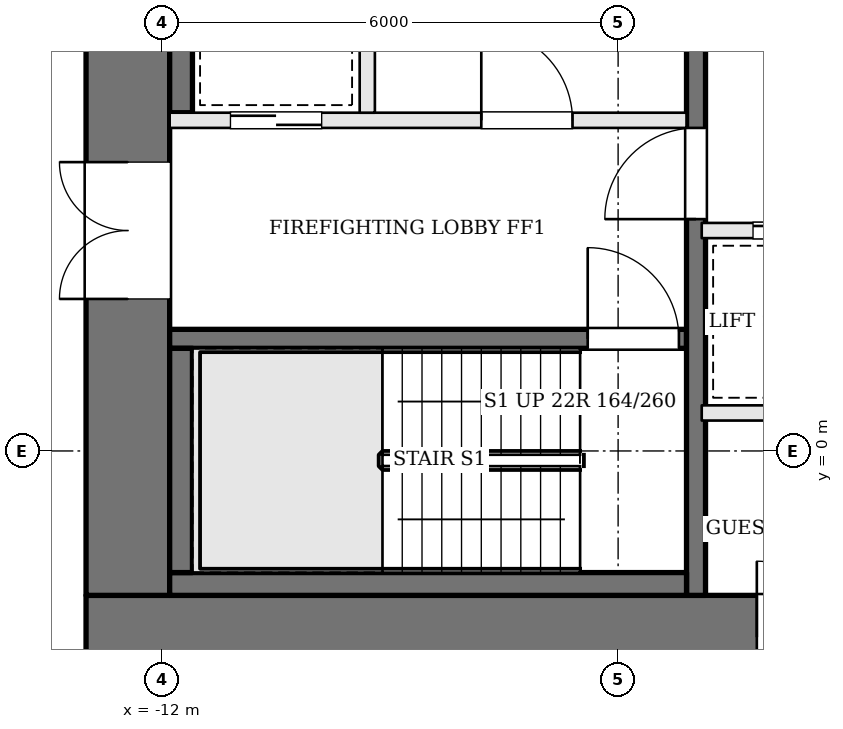
"""IFC4 building model, lengths in metres.
Left out: names, types, materials, properties, quantities, classifications, styles, units other than length and angle.
Written with IfcOpenShell. Run it as: python <this file> out.ifc"""

import sys

from ifc_helpers import new_model, si_unit, direction, frame, frame_2d, origin, place, context, subcontext, project, spatial, rectangle, extrude, element, fill, save


model = new_model("IFC4")
c1 = context("Model", 3, precision=1e-05, world=origin(), true_north=direction((0.0, 1.0)))
c2 = subcontext(c1, "Body", "Model", "MODEL_VIEW")
j1 = project(units=[si_unit("LENGTHUNIT", "METRE"), si_unit("PLANEANGLEUNIT", "RADIAN")], contexts=[c1])
p1 = place(None, origin())
s1 = spatial("IfcSite", under=j1, at=p1, CompositionType="ELEMENT")
p2 = place(p1, origin())
s2 = spatial("IfcBuilding", under=s1, at=p2, CompositionType="ELEMENT")
p3 = place(p2, frame((0.0, 0.0, 117.6)))
s3 = spatial("IfcBuildingStorey", under=s2, at=p3, CompositionType="ELEMENT", Elevation=117.6)
p4 = place(p3, frame((-13.0, -2.45, 0.0), z_axis=(0.0, 0.0, 1.0), x_axis=(1.0, 0.0, 0.0)))
e1 = element("IfcWall", 1, at=p4, inside=s3, PredefinedType="SHEAR", context=c2, shape_type="SweptSolid", body=[
    extrude(rectangle(XDim=26.0, YDim=1.1, at=frame_2d((13.0, 0.0))), origin(), (0.0, 0.0, 1.0), 3.6),
])
p5 = place(p4, frame((8.825, 0.0, 0.0)))
e2 = element("IfcOpeningElement", 2, at=p5, cuts=e1, PredefinedType="OPENING", context=c2, shape_type="SweptSolid", body=[
    extrude(rectangle(XDim=1.0, YDim=2.1, at=frame_2d((0.5, 1.05))), frame((0.0, 0.56, 0.0), z_axis=(0.0, -1.0, 0.0), x_axis=(1.0, 0.0, 0.0)), (0.0, 0.0, 1.0), 1.12),
])
p6 = place(p4, frame((11.275, 0.0, 0.0)))
e3 = element("IfcOpeningElement", 3, at=p6, cuts=e1, PredefinedType="OPENING", context=c2, shape_type="SweptSolid", body=[
    extrude(rectangle(XDim=1.0, YDim=2.1, at=frame_2d((0.5, 1.05))), frame((0.0, 0.56, 0.0), z_axis=(0.0, -1.0, 0.0), x_axis=(1.0, 0.0, 0.0)), (0.0, 0.0, 1.0), 1.12),
])
p7 = place(p4, frame((13.475, 0.0, 0.0)))
e4 = element("IfcOpeningElement", 4, at=p7, cuts=e1, PredefinedType="OPENING", context=c2, shape_type="SweptSolid", body=[
    extrude(rectangle(XDim=0.7, YDim=2.1, at=frame_2d((0.35, 1.05))), frame((0.0, 0.56, 0.0), z_axis=(0.0, -1.0, 0.0), x_axis=(1.0, 0.0, 0.0)), (0.0, 0.0, 1.0), 1.12),
])
p8 = place(p4, frame((15.775, 0.0, 0.0)))
e5 = element("IfcOpeningElement", 5, at=p8, cuts=e1, PredefinedType="OPENING", context=c2, shape_type="SweptSolid", body=[
    extrude(rectangle(XDim=1.0, YDim=2.1, at=frame_2d((0.5, 1.05))), frame((0.0, 0.56, 0.0), z_axis=(0.0, -1.0, 0.0), x_axis=(1.0, 0.0, 0.0)), (0.0, 0.0, 1.0), 1.12),
])
p9 = place(p3, frame((-12.45, -1.9, 0.0), z_axis=(0.0, 0.0, 1.0), x_axis=(0.0, 1.0, 0.0)))
e6 = element("IfcWall", 6, at=p9, inside=s3, PredefinedType="SHEAR", context=c2, shape_type="SweptSolid", body=[
    extrude(rectangle(XDim=12.8, YDim=1.1, at=frame_2d((6.4, 0.0))), origin(), (0.0, 0.0, 1.0), 3.6),
])
p10 = place(p9, frame((3.9, 0.0, 0.0)))
e7 = element("IfcOpeningElement", 7, at=p10, cuts=e6, PredefinedType="OPENING", context=c2, shape_type="SweptSolid", body=[
    extrude(rectangle(XDim=1.8, YDim=2.1, at=frame_2d((0.9, 1.05))), frame((0.0, 0.56, 0.0), z_axis=(0.0, -1.0, 0.0), x_axis=(1.0, 0.0, 0.0)), (0.0, 0.0, 1.0), 1.12),
])
p11 = place(p3, frame((-11.9, 1.475, 0.0), z_axis=(0.0, 0.0, 1.0), x_axis=(1.0, 0.0, 0.0)))
e8 = element("IfcWall", 8, at=p11, inside=s3, PredefinedType="SOLIDWALL", context=c2, shape_type="SweptSolid", body=[
    extrude(rectangle(XDim=6.8, YDim=0.25, at=frame_2d((3.4, 0.0))), origin(), (0.0, 0.0, 1.0), 3.3),
])
p12 = place(p11, frame((5.5, 0.0, 0.0)))
e9 = element("IfcOpeningElement", 9, at=p12, cuts=e8, PredefinedType="OPENING", context=c2, shape_type="SweptSolid", body=[
    extrude(rectangle(XDim=1.2, YDim=2.1, at=frame_2d((0.6, 1.05))), frame((0.0, 0.135, 0.0), z_axis=(0.0, -1.0, 0.0), x_axis=(1.0, 0.0, 0.0)), (0.0, 0.0, 1.0), 0.27),
])
p13 = place(p3, frame((-11.9, 4.35, 0.0), z_axis=(0.0, 0.0, 1.0), x_axis=(1.0, 0.0, 0.0)))
e10 = element("IfcWall", 10, at=p13, inside=s3, PredefinedType="SOLIDWALL", context=c2, shape_type="SweptSolid", body=[
    extrude(rectangle(XDim=6.8, YDim=0.2, at=frame_2d((3.4, 0.0))), origin(), (0.0, 0.0, 1.0), 3.3),
])
p14 = place(p13, frame((4.1, 0.0, 0.0)))
e11 = element("IfcOpeningElement", 11, at=p14, cuts=e10, PredefinedType="OPENING", context=c2, shape_type="SweptSolid", body=[
    extrude(rectangle(XDim=1.2, YDim=2.1, at=frame_2d((0.6, 1.05))), frame((0.0, 0.11, 0.0), z_axis=(0.0, -1.0, 0.0), x_axis=(1.0, 0.0, 0.0)), (0.0, 0.0, 1.0), 0.22),
])
p15 = place(p13, frame((0.8, 0.0, 0.0)))
e12 = element("IfcOpeningElement", 12, at=p15, cuts=e10, PredefinedType="OPENING", context=c2, shape_type="SweptSolid", body=[
    extrude(rectangle(XDim=1.2, YDim=2.1, at=frame_2d((0.6, 1.05))), frame((0.0, 0.11, 0.0), z_axis=(0.0, -1.0, 0.0), x_axis=(1.0, 0.0, 0.0)), (0.0, 0.0, 1.0), 0.22),
])
p16 = place(p3, frame((-9.3, 4.45, 0.0), z_axis=(0.0, 0.0, 1.0), x_axis=(0.0, 1.0, 0.0)))
e13 = element("IfcWall", 13, at=p16, inside=s3, PredefinedType="SOLIDWALL", context=c2, shape_type="SweptSolid", body=[
    extrude(rectangle(XDim=3.0, YDim=0.2, at=frame_2d((1.5, 0.0))), origin(), (0.0, 0.0, 1.0), 3.3),
])
p17 = place(p3, frame((-4.975, -1.9, 0.0), z_axis=(0.0, 0.0, 1.0), x_axis=(0.0, 1.0, 0.0)))
e14 = element("IfcWall", 14, at=p17, inside=s3, PredefinedType="SOLIDWALL", context=c2, shape_type="SweptSolid", body=[
    extrude(rectangle(XDim=12.8, YDim=0.25, at=frame_2d((6.4, 0.0))), origin(), (0.0, 0.0, 1.0), 3.3),
])
p18 = place(p17, frame((4.95, 0.0, 0.0)))
e15 = element("IfcOpeningElement", 15, at=p18, cuts=e14, PredefinedType="OPENING", context=c2, shape_type="SweptSolid", body=[
    extrude(rectangle(XDim=1.2, YDim=2.1, at=frame_2d((0.6, 1.05))), frame((0.0, 0.135, 0.0), z_axis=(0.0, -1.0, 0.0), x_axis=(1.0, 0.0, 0.0)), (0.0, 0.0, 1.0), 0.27),
])
p19 = place(p3, frame((-11.9, -1.75, 0.0), z_axis=(0.0, 0.0, 1.0), x_axis=(1.0, 0.0, 0.0)))
e16 = element("IfcWall", 16, at=p19, inside=s3, PredefinedType="SOLIDWALL", context=c2, shape_type="SweptSolid", body=[
    extrude(rectangle(XDim=6.8, YDim=0.3, at=frame_2d((3.4, 0.0))), origin(), (0.0, 0.0, 1.0), 3.3),
])
p20 = place(p3, frame((-11.75, -1.6, 0.0), z_axis=(0.0, 0.0, 1.0), x_axis=(0.0, 1.0, 0.0)))
e17 = element("IfcWall", 17, at=p20, inside=s3, PredefinedType="SOLIDWALL", context=c2, shape_type="SweptSolid", body=[
    extrude(rectangle(XDim=2.95, YDim=0.3, at=frame_2d((1.475, 0.0))), origin(), (0.0, 0.0, 1.0), 3.3),
])
p21 = place(p3, frame((-11.75, 4.45, 0.0), z_axis=(0.0, 0.0, 1.0), x_axis=(0.0, 1.0, 0.0)))
e18 = element("IfcWall", 18, at=p21, inside=s3, PredefinedType="SOLIDWALL", context=c2, shape_type="SweptSolid", body=[
    extrude(rectangle(XDim=3.0, YDim=0.3, at=frame_2d((1.5, 0.0))), origin(), (0.0, 0.0, 1.0), 3.3),
])
p22 = place(p3, frame((-4.9, 0.5, 0.0), z_axis=(0.0, 0.0, 1.0), x_axis=(1.0, 0.0, 0.0)))
e19 = element("IfcWall", 19, at=p22, inside=s3, PredefinedType="SOLIDWALL", context=c2, shape_type="SweptSolid", body=[
    extrude(rectangle(XDim=9.8, YDim=0.2, at=frame_2d((4.9, 0.0))), origin(), (0.0, 0.0, 1.0), 3.3),
])
p23 = place(p3, frame((-4.9, 2.9, 0.0), z_axis=(0.0, 0.0, 1.0), x_axis=(1.0, 0.0, 0.0)))
e20 = element("IfcWall", 20, at=p23, inside=s3, PredefinedType="SOLIDWALL", context=c2, shape_type="SweptSolid", body=[
    extrude(rectangle(XDim=9.8, YDim=0.2, at=frame_2d((4.9, 0.0))), origin(), (0.0, 0.0, 1.0), 3.3),
])
p24 = place(p23, frame((0.675, 0.0, 0.0)))
e21 = element("IfcOpeningElement", 21, at=p24, cuts=e20, PredefinedType="OPENING", context=c2, shape_type="SweptSolid", body=[
    extrude(rectangle(XDim=1.1, YDim=2.1, at=frame_2d((0.55, 1.05))), frame((0.0, 0.11, 0.0), z_axis=(0.0, -1.0, 0.0), x_axis=(1.0, 0.0, 0.0)), (0.0, 0.0, 1.0), 0.22),
])
p25 = place(p23, frame((3.125, 0.0, 0.0)))
e22 = element("IfcOpeningElement", 22, at=p25, cuts=e20, PredefinedType="OPENING", context=c2, shape_type="SweptSolid", body=[
    extrude(rectangle(XDim=1.1, YDim=2.1, at=frame_2d((0.55, 1.05))), frame((0.0, 0.11, 0.0), z_axis=(0.0, -1.0, 0.0), x_axis=(1.0, 0.0, 0.0)), (0.0, 0.0, 1.0), 0.22),
])
p26 = place(p10, origin())
e23 = element("IfcDoor", 23, at=p26, inside=s3, OperationType="DOUBLE_DOOR_SINGLE_SWING", PredefinedType="DOOR", context=c2, shape_type="SweptSolid", body=[
    extrude(rectangle(XDim=1.8, YDim=2.1, at=frame_2d((0.9, 1.05))), frame((0.0, 0.025, 0.0), z_axis=(0.0, -1.0, 0.0), x_axis=(1.0, 0.0, 0.0)), (0.0, 0.0, 1.0), 0.05),
])
fill(e7, e23)
p27 = place(p18, origin())
e24 = element("IfcDoor", 24, at=p27, inside=s3, OperationType="SINGLE_SWING_LEFT", PredefinedType="DOOR", context=c2, shape_type="SweptSolid", body=[
    extrude(rectangle(XDim=1.2, YDim=2.1, at=frame_2d((0.6, 1.05))), frame((0.0, 0.025, 0.0), z_axis=(0.0, -1.0, 0.0), x_axis=(1.0, 0.0, 0.0)), (0.0, 0.0, 1.0), 0.05),
])
fill(e15, e24)
p28 = place(p14, origin())
e25 = element("IfcDoor", 25, at=p28, inside=s3, OperationType="SINGLE_SWING_LEFT", PredefinedType="DOOR", context=c2, shape_type="SweptSolid", body=[
    extrude(rectangle(XDim=1.2, YDim=2.1, at=frame_2d((0.6, 1.05))), frame((0.0, 0.025, 0.0), z_axis=(0.0, -1.0, 0.0), x_axis=(1.0, 0.0, 0.0)), (0.0, 0.0, 1.0), 0.05),
])
fill(e11, e25)
p29 = place(p12, origin())
e26 = element("IfcDoor", 26, at=p29, inside=s3, OperationType="SINGLE_SWING_LEFT", PredefinedType="DOOR", context=c2, shape_type="SweptSolid", body=[
    extrude(rectangle(XDim=1.2, YDim=2.1, at=frame_2d((0.6, 1.05))), frame((0.0, 0.025, 0.0), z_axis=(0.0, -1.0, 0.0), x_axis=(1.0, 0.0, 0.0)), (0.0, 0.0, 1.0), 0.05),
])
fill(e9, e26)
p30 = place(p15, origin())
e27 = element("IfcDoor", 27, at=p30, inside=s3, OperationType="SLIDING_TO_RIGHT", PredefinedType="DOOR", context=c2, shape_type="SweptSolid", body=[
    extrude(rectangle(XDim=1.2, YDim=2.1, at=frame_2d((0.6, 1.05))), frame((0.0, 0.025, 0.0), z_axis=(0.0, -1.0, 0.0), x_axis=(1.0, 0.0, 0.0)), (0.0, 0.0, 1.0), 0.05),
])
fill(e12, e27)
p31 = place(p24, origin())
e28 = element("IfcDoor", 28, at=p31, inside=s3, OperationType="SLIDING_TO_RIGHT", PredefinedType="DOOR", context=c2, shape_type="SweptSolid", body=[
    extrude(rectangle(XDim=1.1, YDim=2.1, at=frame_2d((0.55, 1.05))), frame((0.0, 0.025, 0.0), z_axis=(0.0, -1.0, 0.0), x_axis=(1.0, 0.0, 0.0)), (0.0, 0.0, 1.0), 0.05),
])
fill(e21, e28)
p32 = place(p5, origin())
e29 = element("IfcDoor", 29, at=p32, inside=s3, OperationType="SINGLE_SWING_LEFT", PredefinedType="DOOR", context=c2, shape_type="SweptSolid", body=[
    extrude(rectangle(XDim=1.0, YDim=2.1, at=frame_2d((0.5, 1.05))), frame((0.0, 0.025, 0.0), z_axis=(0.0, -1.0, 0.0), x_axis=(1.0, 0.0, 0.0)), (0.0, 0.0, 1.0), 0.05),
])
fill(e2, e29)
save(model, sys.argv[1])
